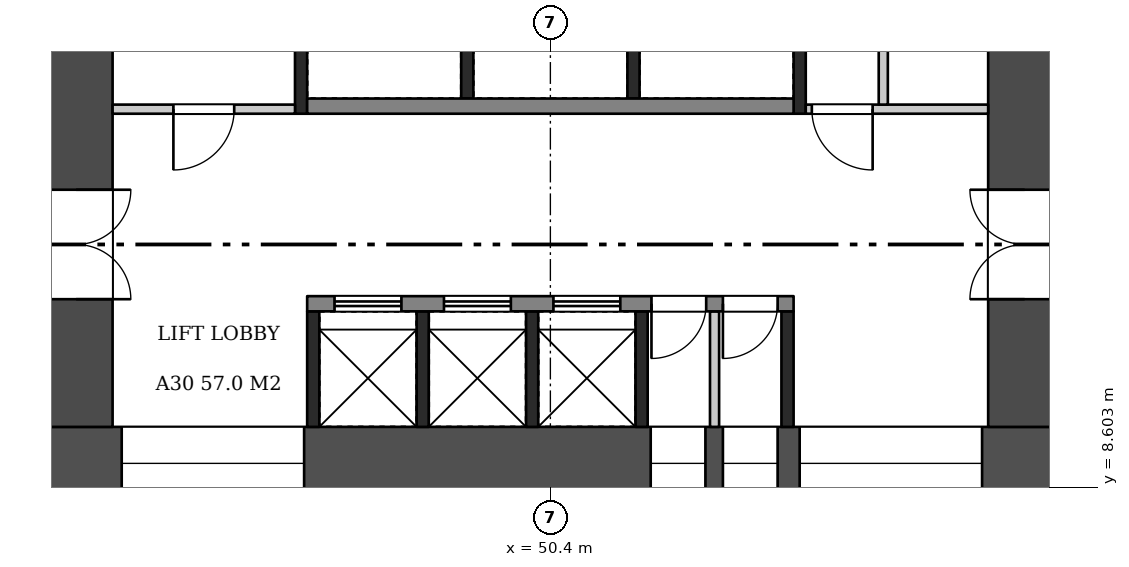
"""IFC4 building model, lengths in metres.
Left out: names, types, materials, properties, quantities, classifications, styles, units other than length and angle.
Written with IfcOpenShell. Run it as: python <this file> out.ifc"""

import sys

from ifc_helpers import new_model, si_unit, direction, frame, frame_2d, origin, place, context, subcontext, project, spatial, rectangle, extrude, element, fill, save


model = new_model("IFC4")
c1 = context("Model", 3, precision=1e-05, world=origin(), true_north=direction((0.0, 1.0)))
c2 = subcontext(c1, "Body", "Model", "MODEL_VIEW")
j1 = project(units=[si_unit("LENGTHUNIT", "METRE"), si_unit("PLANEANGLEUNIT", "RADIAN")], contexts=[c1])
p1 = place(None, origin())
s1 = spatial("IfcSite", under=j1, at=p1, CompositionType="ELEMENT")
p2 = place(p1, origin())
s2 = spatial("IfcBuilding", under=s1, at=p2, CompositionType="ELEMENT")
p3 = place(p2, frame((0.0, 0.0, 119.7)))
s3 = spatial("IfcBuildingStorey", under=s2, at=p3, CompositionType="ELEMENT", Elevation=119.7)
p4 = place(p3, frame((42.0, 9.0, 0.0), z_axis=(0.0, 0.0, 1.0), x_axis=(1.0, 0.0, 0.0)))
e1 = element("IfcWall", 1, at=p4, inside=s3, PredefinedType="SHEAR", context=c2, shape_type="SweptSolid", body=[
    extrude(rectangle(XDim=16.8, YDim=1.2, at=frame_2d((8.4, 0.0))), origin(), (0.0, 0.0, 1.0), 3.22),
])
p5 = place(p4, frame((1.35, 0.0, 0.6)))
e2 = element("IfcOpeningElement", 2, at=p5, cuts=e1, PredefinedType="OPENING", context=c2, shape_type="SweptSolid", body=[
    extrude(rectangle(XDim=3.0, YDim=2.1, at=frame_2d((1.5, 1.05))), frame((0.0, 0.61, 0.0), z_axis=(0.0, -1.0, 0.0), x_axis=(1.0, 0.0, 0.0)), (0.0, 0.0, 1.0), 1.22),
])
p6 = place(p4, frame((10.05, 0.0, 1.6)))
e3 = element("IfcOpeningElement", 3, at=p6, cuts=e1, PredefinedType="OPENING", context=c2, shape_type="SweptSolid", body=[
    extrude(rectangle(XDim=0.9, YDim=1.2, at=frame_2d((0.45, 0.6))), frame((0.0, 0.61, 0.0), z_axis=(0.0, -1.0, 0.0), x_axis=(1.0, 0.0, 0.0)), (0.0, 0.0, 1.0), 1.22),
])
p7 = place(p4, frame((11.238, 0.0, 1.6)))
e4 = element("IfcOpeningElement", 4, at=p7, cuts=e1, PredefinedType="OPENING", context=c2, shape_type="SweptSolid", body=[
    extrude(rectangle(XDim=0.9, YDim=1.2, at=frame_2d((0.45, 0.6))), frame((0.0, 0.61, 0.0), z_axis=(0.0, -1.0, 0.0), x_axis=(1.0, 0.0, 0.0)), (0.0, 0.0, 1.0), 1.22),
])
p8 = place(p4, frame((12.5, 0.0, 0.6)))
e5 = element("IfcOpeningElement", 5, at=p8, cuts=e1, PredefinedType="OPENING", context=c2, shape_type="SweptSolid", body=[
    extrude(rectangle(XDim=3.0, YDim=2.1, at=frame_2d((1.5, 1.05))), frame((0.0, 0.61, 0.0), z_axis=(0.0, -1.0, 0.0), x_axis=(1.0, 0.0, 0.0)), (0.0, 0.0, 1.0), 1.22),
])
p9 = place(p3, frame((42.6, 9.6, 0.0), z_axis=(0.0, 0.0, 1.0), x_axis=(0.0, 1.0, 0.0)))
e6 = element("IfcWall", 6, at=p9, inside=s3, PredefinedType="SHEAR", context=c2, shape_type="SweptSolid", body=[
    extrude(rectangle(XDim=14.4, YDim=1.2, at=frame_2d((7.2, 0.0))), origin(), (0.0, 0.0, 1.0), 3.22),
])
p10 = place(p9, frame((2.1, 0.0, 0.0)))
e7 = element("IfcOpeningElement", 7, at=p10, cuts=e6, PredefinedType="OPENING", context=c2, shape_type="SweptSolid", body=[
    extrude(rectangle(XDim=1.8, YDim=2.1, at=frame_2d((0.9, 1.05))), frame((0.0, 0.61, 0.0), z_axis=(0.0, -1.0, 0.0), x_axis=(1.0, 0.0, 0.0)), (0.0, 0.0, 1.0), 1.22),
])
p11 = place(p3, frame((58.2, 9.6, 0.0), z_axis=(0.0, 0.0, 1.0), x_axis=(0.0, 1.0, 0.0)))
e8 = element("IfcWall", 8, at=p11, inside=s3, PredefinedType="SHEAR", context=c2, shape_type="SweptSolid", body=[
    extrude(rectangle(XDim=14.4, YDim=1.2, at=frame_2d((7.2, 0.0))), origin(), (0.0, 0.0, 1.0), 3.22),
])
p12 = place(p11, frame((2.1, 0.0, 0.0)))
e9 = element("IfcOpeningElement", 9, at=p12, cuts=e8, PredefinedType="OPENING", context=c2, shape_type="SweptSolid", body=[
    extrude(rectangle(XDim=1.8, YDim=2.1, at=frame_2d((0.9, 1.05))), frame((0.0, 0.61, 0.0), z_axis=(0.0, -1.0, 0.0), x_axis=(1.0, 0.0, 0.0)), (0.0, 0.0, 1.0), 1.22),
])
for number, where, z_axis, x_axis in (
    (10, (46.5, 9.6, 0.0), (0.0, 0.0, 1.0), (0.0, 1.0, 0.0)),
    (11, (48.3, 9.6, 0.0), (0.0, 0.0, 1.0), (0.0, 1.0, 0.0)),
    (12, (50.1, 9.6, 0.0), (0.0, 0.0, 1.0), (0.0, 1.0, 0.0)),
    (13, (51.9, 9.6, 0.0), (0.0, 0.0, 1.0), (0.0, 1.0, 0.0)),
    (14, (54.3, 9.6, 0.0), (0.0, 0.0, 1.0), (0.0, 1.0, 0.0)),
):
    element("IfcWall", number, at=place(p3, frame(where, z_axis=z_axis, x_axis=x_axis)), inside=s3, PredefinedType="SHEAR", context=c2, shape_type="SweptSolid", body=[
        extrude(rectangle(XDim=1.9, YDim=0.2, at=frame_2d((0.95, 0.0))), origin(), (0.0, 0.0, 1.0), 3.22),
    ])
p13 = place(p3, frame((53.1, 9.6, 0.0), z_axis=(0.0, 0.0, 1.0), x_axis=(0.0, 1.0, 0.0)))
e15 = element("IfcWall", 15, at=p13, inside=s3, PredefinedType="PARTITIONING", context=c2, shape_type="SweptSolid", body=[
    extrude(rectangle(XDim=1.9, YDim=0.15, at=frame_2d((0.95, 0.0))), origin(), (0.0, 0.0, 1.0), 3.22),
])
p14 = place(p3, frame((46.4, 11.625, 0.0), z_axis=(0.0, 0.0, 1.0), x_axis=(1.0, 0.0, 0.0)))
e16 = element("IfcWall", 16, at=p14, inside=s3, PredefinedType="SHEAR", context=c2, shape_type="SweptSolid", body=[
    extrude(rectangle(XDim=8.0, YDim=0.25, at=frame_2d((4.0, 0.0))), origin(), (0.0, 0.0, 1.0), 3.22),
])
p15 = place(p14, frame((0.45, 0.0, 0.0)))
e17 = element("IfcOpeningElement", 17, at=p15, cuts=e16, PredefinedType="OPENING", context=c2, shape_type="SweptSolid", body=[
    extrude(rectangle(XDim=1.1, YDim=2.1, at=frame_2d((0.55, 1.05))), frame((0.0, 0.135, 0.0), z_axis=(0.0, -1.0, 0.0), x_axis=(1.0, 0.0, 0.0)), (0.0, 0.0, 1.0), 0.27),
])
p16 = place(p14, frame((2.25, 0.0, 0.0)))
e18 = element("IfcOpeningElement", 18, at=p16, cuts=e16, PredefinedType="OPENING", context=c2, shape_type="SweptSolid", body=[
    extrude(rectangle(XDim=1.1, YDim=2.1, at=frame_2d((0.55, 1.05))), frame((0.0, 0.135, 0.0), z_axis=(0.0, -1.0, 0.0), x_axis=(1.0, 0.0, 0.0)), (0.0, 0.0, 1.0), 0.27),
])
p17 = place(p14, frame((4.05, 0.0, 0.0)))
e19 = element("IfcOpeningElement", 19, at=p17, cuts=e16, PredefinedType="OPENING", context=c2, shape_type="SweptSolid", body=[
    extrude(rectangle(XDim=1.1, YDim=2.1, at=frame_2d((0.55, 1.05))), frame((0.0, 0.135, 0.0), z_axis=(0.0, -1.0, 0.0), x_axis=(1.0, 0.0, 0.0)), (0.0, 0.0, 1.0), 0.27),
])
p18 = place(p14, frame((5.663, 0.0, 0.0)))
e20 = element("IfcOpeningElement", 20, at=p18, cuts=e16, PredefinedType="OPENING", context=c2, shape_type="SweptSolid", body=[
    extrude(rectangle(XDim=0.9, YDim=2.1, at=frame_2d((0.45, 1.05))), frame((0.0, 0.135, 0.0), z_axis=(0.0, -1.0, 0.0), x_axis=(1.0, 0.0, 0.0)), (0.0, 0.0, 1.0), 0.27),
])
p19 = place(p14, frame((6.837, 0.0, 0.0)))
e21 = element("IfcOpeningElement", 21, at=p19, cuts=e16, PredefinedType="OPENING", context=c2, shape_type="SweptSolid", body=[
    extrude(rectangle(XDim=0.9, YDim=2.1, at=frame_2d((0.45, 1.05))), frame((0.0, 0.135, 0.0), z_axis=(0.0, -1.0, 0.0), x_axis=(1.0, 0.0, 0.0)), (0.0, 0.0, 1.0), 0.27),
])
for number, where, z_axis, x_axis in (
    (22, (49.033, 15.0, 0.0), (0.0, 0.0, 1.0), (0.0, 1.0, 0.0)),
    (23, (51.767, 15.0, 0.0), (0.0, 0.0, 1.0), (0.0, 1.0, 0.0)),
):
    element("IfcWall", number, at=place(p3, frame(where, z_axis=z_axis, x_axis=x_axis)), inside=s3, PredefinedType="SHEAR", context=c2, shape_type="SweptSolid", body=[
        extrude(rectangle(XDim=1.9, YDim=0.2, at=frame_2d((0.95, 0.0))), origin(), (0.0, 0.0, 1.0), 3.22),
    ])
p20 = place(p3, frame((46.4, 14.875, 0.0), z_axis=(0.0, 0.0, 1.0), x_axis=(1.0, 0.0, 0.0)))
e24 = element("IfcWall", 24, at=p20, inside=s3, PredefinedType="SHEAR", context=c2, shape_type="SweptSolid", body=[
    extrude(rectangle(XDim=8.0, YDim=0.25, at=frame_2d((4.0, 0.0))), origin(), (0.0, 0.0, 1.0), 3.22),
])
p21 = place(p3, frame((46.3, 14.75, 0.0), z_axis=(0.0, 0.0, 1.0), x_axis=(0.0, 1.0, 0.0)))
e25 = element("IfcWall", 25, at=p21, inside=s3, PredefinedType="SHEAR", context=c2, shape_type="SweptSolid", body=[
    extrude(rectangle(XDim=2.4, YDim=0.2, at=frame_2d((1.2, 0.0))), origin(), (0.0, 0.0, 1.0), 3.22),
])
p22 = place(p3, frame((43.2, 14.825, 0.0), z_axis=(0.0, 0.0, 1.0), x_axis=(1.0, 0.0, 0.0)))
e26 = element("IfcWall", 26, at=p22, inside=s3, PredefinedType="PARTITIONING", context=c2, shape_type="SweptSolid", body=[
    extrude(rectangle(XDim=3.0, YDim=0.15, at=frame_2d((1.5, 0.0))), origin(), (0.0, 0.0, 1.0), 3.22),
])
p23 = place(p22, frame((1.0, 0.0, 0.0)))
e27 = element("IfcOpeningElement", 27, at=p23, cuts=e26, PredefinedType="OPENING", context=c2, shape_type="SweptSolid", body=[
    extrude(rectangle(XDim=1.0, YDim=2.1, at=frame_2d((0.5, 1.05))), frame((0.0, 0.085, 0.0), z_axis=(0.0, -1.0, 0.0), x_axis=(1.0, 0.0, 0.0)), (0.0, 0.0, 1.0), 0.17),
])
p24 = place(p3, frame((54.5, 14.75, 0.0), z_axis=(0.0, 0.0, 1.0), x_axis=(0.0, 1.0, 0.0)))
e28 = element("IfcWall", 28, at=p24, inside=s3, PredefinedType="SHEAR", context=c2, shape_type="SweptSolid", body=[
    extrude(rectangle(XDim=9.25, YDim=0.2, at=frame_2d((4.625, 0.0))), origin(), (0.0, 0.0, 1.0), 3.22),
])
p25 = place(p3, frame((54.6, 14.825, 0.0), z_axis=(0.0, 0.0, 1.0), x_axis=(1.0, 0.0, 0.0)))
e29 = element("IfcWall", 29, at=p25, inside=s3, PredefinedType="PARTITIONING", context=c2, shape_type="SweptSolid", body=[
    extrude(rectangle(XDim=3.0, YDim=0.15, at=frame_2d((1.5, 0.0))), origin(), (0.0, 0.0, 1.0), 3.22),
])
p26 = place(p25, frame((0.1, 0.0, 0.0)))
e30 = element("IfcOpeningElement", 30, at=p26, cuts=e29, PredefinedType="OPENING", context=c2, shape_type="SweptSolid", body=[
    extrude(rectangle(XDim=1.0, YDim=2.1, at=frame_2d((0.5, 1.05))), frame((0.0, 0.085, 0.0), z_axis=(0.0, -1.0, 0.0), x_axis=(1.0, 0.0, 0.0)), (0.0, 0.0, 1.0), 0.17),
])
p27 = place(p3, frame((55.875, 14.9, 0.0), z_axis=(0.0, 0.0, 1.0), x_axis=(0.0, 1.0, 0.0)))
e31 = element("IfcWall", 31, at=p27, inside=s3, PredefinedType="PARTITIONING", context=c2, shape_type="SweptSolid", body=[
    extrude(rectangle(XDim=9.1, YDim=0.15, at=frame_2d((4.55, 0.0))), origin(), (0.0, 0.0, 1.0), 3.22),
])
p28 = place(p27, frame((1.09, 0.0, 0.0)))
e32 = element("IfcOpeningElement", 32, at=p28, cuts=e31, PredefinedType="OPENING", context=c2, shape_type="SweptSolid", body=[
    extrude(rectangle(XDim=0.9, YDim=2.1, at=frame_2d((0.45, 1.05))), frame((0.0, 0.085, 0.0), z_axis=(0.0, -1.0, 0.0), x_axis=(1.0, 0.0, 0.0)), (0.0, 0.0, 1.0), 0.17),
])
p29 = place(p27, frame((4.32, 0.0, 0.0)))
e33 = element("IfcOpeningElement", 33, at=p29, cuts=e31, PredefinedType="OPENING", context=c2, shape_type="SweptSolid", body=[
    extrude(rectangle(XDim=0.9, YDim=2.1, at=frame_2d((0.45, 1.05))), frame((0.0, 0.085, 0.0), z_axis=(0.0, -1.0, 0.0), x_axis=(1.0, 0.0, 0.0)), (0.0, 0.0, 1.0), 0.17),
])
p30 = place(p27, frame((7.33, 0.0, 0.0)))
e34 = element("IfcOpeningElement", 34, at=p30, cuts=e31, PredefinedType="OPENING", context=c2, shape_type="SweptSolid", body=[
    extrude(rectangle(XDim=0.9, YDim=2.1, at=frame_2d((0.45, 1.05))), frame((0.0, 0.085, 0.0), z_axis=(0.0, -1.0, 0.0), x_axis=(1.0, 0.0, 0.0)), (0.0, 0.0, 1.0), 0.17),
])
p31 = place(p10, frame((1.8, 0.0, 0.0), z_axis=(0.0, 0.0, 1.0), x_axis=(-1.0, 0.0, 0.0)))
e35 = element("IfcDoor", 35, at=p31, inside=s3, OperationType="DOUBLE_DOOR_SINGLE_SWING", PredefinedType="DOOR", context=c2, shape_type="SweptSolid", body=[
    extrude(rectangle(XDim=1.8, YDim=2.1, at=frame_2d((0.9, 1.05))), frame((0.0, 0.025, 0.0), z_axis=(0.0, -1.0, 0.0), x_axis=(1.0, 0.0, 0.0)), (0.0, 0.0, 1.0), 0.05),
])
fill(e7, e35)
p32 = place(p12, origin())
e36 = element("IfcDoor", 36, at=p32, inside=s3, OperationType="DOUBLE_DOOR_SINGLE_SWING", PredefinedType="DOOR", context=c2, shape_type="SweptSolid", body=[
    extrude(rectangle(XDim=1.8, YDim=2.1, at=frame_2d((0.9, 1.05))), frame((0.0, 0.025, 0.0), z_axis=(0.0, -1.0, 0.0), x_axis=(1.0, 0.0, 0.0)), (0.0, 0.0, 1.0), 0.05),
])
fill(e9, e36)
p33 = place(p15, origin())
e37 = element("IfcDoor", 37, at=p33, inside=s3, OperationType="DOUBLE_DOOR_SLIDING", PredefinedType="DOOR", context=c2, shape_type="SweptSolid", body=[
    extrude(rectangle(XDim=1.1, YDim=2.1, at=frame_2d((0.55, 1.05))), frame((0.0, 0.025, 0.0), z_axis=(0.0, -1.0, 0.0), x_axis=(1.0, 0.0, 0.0)), (0.0, 0.0, 1.0), 0.05),
])
fill(e17, e37)
p34 = place(p16, origin())
e38 = element("IfcDoor", 38, at=p34, inside=s3, OperationType="DOUBLE_DOOR_SLIDING", PredefinedType="DOOR", context=c2, shape_type="SweptSolid", body=[
    extrude(rectangle(XDim=1.1, YDim=2.1, at=frame_2d((0.55, 1.05))), frame((0.0, 0.025, 0.0), z_axis=(0.0, -1.0, 0.0), x_axis=(1.0, 0.0, 0.0)), (0.0, 0.0, 1.0), 0.05),
])
fill(e18, e38)
p35 = place(p17, origin())
e39 = element("IfcDoor", 39, at=p35, inside=s3, OperationType="DOUBLE_DOOR_SLIDING", PredefinedType="DOOR", context=c2, shape_type="SweptSolid", body=[
    extrude(rectangle(XDim=1.1, YDim=2.1, at=frame_2d((0.55, 1.05))), frame((0.0, 0.025, 0.0), z_axis=(0.0, -1.0, 0.0), x_axis=(1.0, 0.0, 0.0)), (0.0, 0.0, 1.0), 0.05),
])
fill(e19, e39)
p36 = place(p18, frame((0.9, 0.0, 0.0), z_axis=(0.0, 0.0, 1.0), x_axis=(-1.0, 0.0, 0.0)))
e40 = element("IfcDoor", 40, at=p36, inside=s3, OperationType="SINGLE_SWING_RIGHT", PredefinedType="DOOR", context=c2, shape_type="SweptSolid", body=[
    extrude(rectangle(XDim=0.9, YDim=2.1, at=frame_2d((0.45, 1.05))), frame((0.0, 0.025, 0.0), z_axis=(0.0, -1.0, 0.0), x_axis=(1.0, 0.0, 0.0)), (0.0, 0.0, 1.0), 0.05),
])
fill(e20, e40)
p37 = place(p19, frame((0.9, 0.0, 0.0), z_axis=(0.0, 0.0, 1.0), x_axis=(-1.0, 0.0, 0.0)))
e41 = element("IfcDoor", 41, at=p37, inside=s3, OperationType="SINGLE_SWING_RIGHT", PredefinedType="DOOR", context=c2, shape_type="SweptSolid", body=[
    extrude(rectangle(XDim=0.9, YDim=2.1, at=frame_2d((0.45, 1.05))), frame((0.0, 0.025, 0.0), z_axis=(0.0, -1.0, 0.0), x_axis=(1.0, 0.0, 0.0)), (0.0, 0.0, 1.0), 0.05),
])
fill(e21, e41)
p38 = place(p23, frame((1.0, 0.0, 0.0), z_axis=(0.0, 0.0, 1.0), x_axis=(-1.0, 0.0, 0.0)))
e42 = element("IfcDoor", 42, at=p38, inside=s3, OperationType="SINGLE_SWING_RIGHT", PredefinedType="DOOR", context=c2, shape_type="SweptSolid", body=[
    extrude(rectangle(XDim=1.0, YDim=2.1, at=frame_2d((0.5, 1.05))), frame((0.0, 0.025, 0.0), z_axis=(0.0, -1.0, 0.0), x_axis=(1.0, 0.0, 0.0)), (0.0, 0.0, 1.0), 0.05),
])
fill(e27, e42)
p39 = place(p26, frame((1.0, 0.0, 0.0), z_axis=(0.0, 0.0, 1.0), x_axis=(-1.0, 0.0, 0.0)))
e43 = element("IfcDoor", 43, at=p39, inside=s3, OperationType="SINGLE_SWING_LEFT", PredefinedType="DOOR", context=c2, shape_type="SweptSolid", body=[
    extrude(rectangle(XDim=1.0, YDim=2.1, at=frame_2d((0.5, 1.05))), frame((0.0, 0.025, 0.0), z_axis=(0.0, -1.0, 0.0), x_axis=(1.0, 0.0, 0.0)), (0.0, 0.0, 1.0), 0.05),
])
fill(e30, e43)
p40 = place(p5, origin())
e44 = element("IfcWindow", 44, at=p40, inside=s3, PartitioningType="SINGLE_PANEL", PredefinedType="WINDOW", context=c2, shape_type="SweptSolid", body=[
    extrude(rectangle(XDim=3.0, YDim=2.1, at=frame_2d((1.5, 1.05))), frame((0.0, 0.03, 0.0), z_axis=(0.0, -1.0, 0.0), x_axis=(1.0, 0.0, 0.0)), (0.0, 0.0, 1.0), 0.06),
])
fill(e2, e44)
p41 = place(p6, origin())
e45 = element("IfcWindow", 45, at=p41, inside=s3, PartitioningType="SINGLE_PANEL", PredefinedType="WINDOW", context=c2, shape_type="SweptSolid", body=[
    extrude(rectangle(XDim=0.9, YDim=1.2, at=frame_2d((0.45, 0.6))), frame((0.0, 0.03, 0.0), z_axis=(0.0, -1.0, 0.0), x_axis=(1.0, 0.0, 0.0)), (0.0, 0.0, 1.0), 0.06),
])
fill(e3, e45)
p42 = place(p7, origin())
e46 = element("IfcWindow", 46, at=p42, inside=s3, PartitioningType="SINGLE_PANEL", PredefinedType="WINDOW", context=c2, shape_type="SweptSolid", body=[
    extrude(rectangle(XDim=0.9, YDim=1.2, at=frame_2d((0.45, 0.6))), frame((0.0, 0.03, 0.0), z_axis=(0.0, -1.0, 0.0), x_axis=(1.0, 0.0, 0.0)), (0.0, 0.0, 1.0), 0.06),
])
fill(e4, e46)
p43 = place(p8, origin())
e47 = element("IfcWindow", 47, at=p43, inside=s3, PartitioningType="SINGLE_PANEL", PredefinedType="WINDOW", context=c2, shape_type="SweptSolid", body=[
    extrude(rectangle(XDim=3.0, YDim=2.1, at=frame_2d((1.5, 1.05))), frame((0.0, 0.03, 0.0), z_axis=(0.0, -1.0, 0.0), x_axis=(1.0, 0.0, 0.0)), (0.0, 0.0, 1.0), 0.06),
])
fill(e5, e47)
save(model, sys.argv[1])
